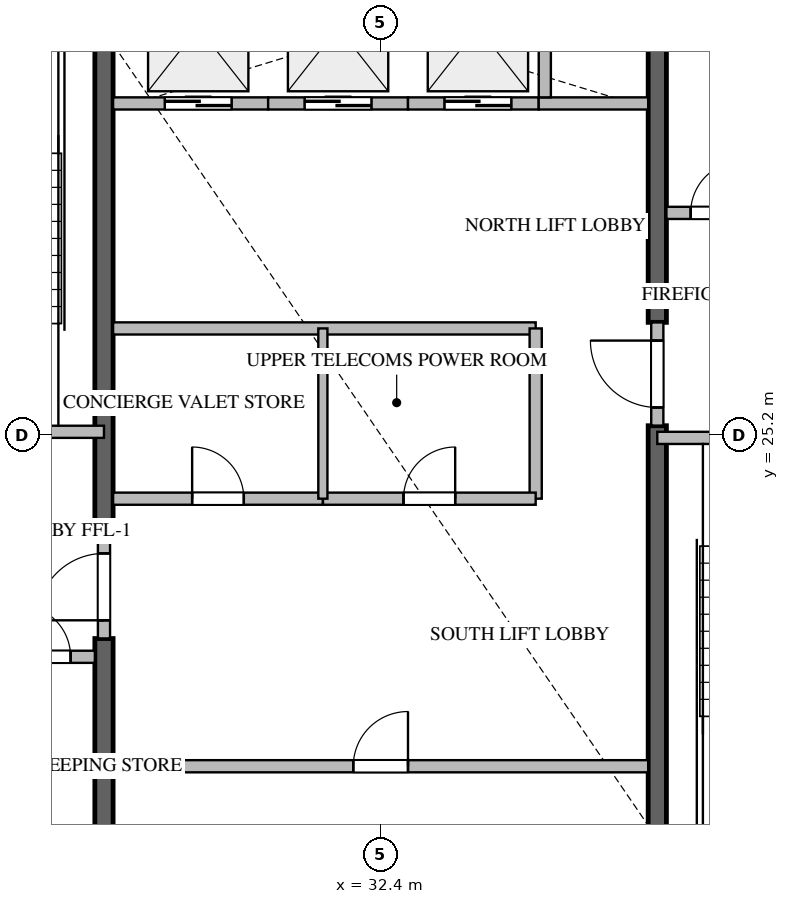
"""IFC4 building model, lengths in metres.
Left out: names, types, materials, properties, quantities, classifications, styles, units other than length and angle.
Written with IfcOpenShell. Run it as: python <this file> out.ifc"""

import sys

from ifc_helpers import new_model, si_unit, direction, frame, frame_2d, origin, place, context, subcontext, project, spatial, rectangle, extrude, source, transform, mapped, element, fill, save


model = new_model("IFC4")
c1 = context("Model", 3, precision=1e-05, world=origin(), true_north=direction((0.0, 1.0)))
c2 = subcontext(c1, "Body", "Model", "MODEL_VIEW")
j1 = project(units=[si_unit("LENGTHUNIT", "METRE"), si_unit("PLANEANGLEUNIT", "RADIAN")], contexts=[c1])
p1 = place(None, origin())
s1 = spatial("IfcSite", under=j1, at=p1, CompositionType="ELEMENT")
p2 = place(p1, origin())
s2 = spatial("IfcBuilding", under=s1, at=p2, CompositionType="ELEMENT")
p3 = place(p2, frame((0.0, 0.0, 325.85)))
s3 = spatial("IfcBuildingStorey", under=s2, at=p3, CompositionType="ELEMENT", Elevation=325.85)
p4 = place(p3, frame((27.85, 16.975, -0.26), z_axis=(0.0, 0.0, 1.0), x_axis=(0.0, 1.0, 0.0)))
e1 = element("IfcWall", 1, at=p4, inside=s3, PredefinedType="SHEAR", context=c2, shape_type="SweptSolid", body=[
    extrude(rectangle(XDim=4.875, YDim=0.3, at=frame_2d((2.438, 0.0))), origin(), (0.0, 0.0, 1.0), 4.048),
])
p5 = place(p3, frame((27.85, 23.55, -0.26), z_axis=(0.0, 0.0, 1.0), x_axis=(0.0, 1.0, 0.0)))
e2 = element("IfcWall", 2, at=p5, inside=s3, PredefinedType="SHEAR", context=c2, shape_type="SweptSolid", body=[
    extrude(rectangle(XDim=9.875, YDim=0.3, at=frame_2d((4.938, 0.0))), origin(), (0.0, 0.0, 1.0), 4.048),
])
p6 = place(p3, frame((36.95, 16.975, -0.26), z_axis=(0.0, 0.0, 1.0), x_axis=(0.0, 1.0, 0.0)))
e3 = element("IfcWall", 3, at=p6, inside=s3, PredefinedType="SHEAR", context=c2, shape_type="SweptSolid", body=[
    extrude(rectangle(XDim=8.375, YDim=0.3, at=frame_2d((4.188, 0.0))), origin(), (0.0, 0.0, 1.0), 4.048),
])
p7 = place(p3, frame((36.95, 27.05, -0.26), z_axis=(0.0, 0.0, 1.0), x_axis=(0.0, 1.0, 0.0)))
e4 = element("IfcWall", 4, at=p7, inside=s3, PredefinedType="SHEAR", context=c2, shape_type="SweptSolid", body=[
    extrude(rectangle(XDim=6.375, YDim=0.3, at=frame_2d((3.188, 0.0))), origin(), (0.0, 0.0, 1.0), 4.048),
])
p8 = place(p3, frame((23.4, 25.25, 0.0), z_axis=(0.0, 0.0, 1.0), x_axis=(1.0, 0.0, 0.0)))
e5 = element("IfcWall", 5, at=p8, inside=s3, PredefinedType="STANDARD", context=c2, shape_type="SweptSolid", body=[
    extrude(rectangle(XDim=4.45, YDim=0.2, at=frame_2d((2.225, 0.0))), origin(), (0.0, 0.0, 1.0), 3.79),
])
p9 = place(p8, frame((1.65, 0.0, 0.0)))
e6 = element("IfcOpeningElement", 6, at=p9, cuts=e5, PredefinedType="OPENING", context=c2, shape_type="SweptSolid", body=[
    extrude(rectangle(XDim=1.1, YDim=2.15, at=frame_2d((0.55, 1.075))), frame((0.0, 0.11, 0.0), z_axis=(0.0, -1.0, 0.0), x_axis=(1.0, 0.0, 0.0)), (0.0, 0.0, 1.0), 0.22),
])
p10 = place(p3, frame((36.95, 25.15, 0.0), z_axis=(0.0, 0.0, 1.0), x_axis=(1.0, 0.0, 0.0)))
e7 = element("IfcWall", 7, at=p10, inside=s3, PredefinedType="STANDARD", context=c2, shape_type="SweptSolid", body=[
    extrude(rectangle(XDim=4.45, YDim=0.2, at=frame_2d((2.225, 0.0))), origin(), (0.0, 0.0, 1.0), 3.79),
])
p11 = place(p10, frame((1.65, 0.0, 0.0)))
e8 = element("IfcOpeningElement", 8, at=p11, cuts=e7, PredefinedType="OPENING", context=c2, shape_type="SweptSolid", body=[
    extrude(rectangle(XDim=1.1, YDim=2.15, at=frame_2d((0.55, 1.075))), frame((0.0, 0.11, 0.0), z_axis=(0.0, -1.0, 0.0), x_axis=(1.0, 0.0, 0.0)), (0.0, 0.0, 1.0), 0.22),
])
p12 = place(p3, frame((28.0, 30.65, 0.0), z_axis=(0.0, 0.0, 1.0), x_axis=(1.0, 0.0, 0.0)))
e9 = element("IfcWall", 9, at=p12, inside=s3, PredefinedType="STANDARD", context=c2, shape_type="SweptSolid", body=[
    extrude(rectangle(XDim=2.55, YDim=0.2, at=frame_2d((1.275, 0.0))), origin(), (0.0, 0.0, 1.0), 3.79),
])
p13 = place(p12, frame((0.85, 0.0, 0.0)))
e10 = element("IfcOpeningElement", 10, at=p13, cuts=e9, PredefinedType="OPENING", context=c2, shape_type="SweptSolid", body=[
    extrude(rectangle(XDim=1.1, YDim=2.2, at=frame_2d((0.55, 1.1))), frame((0.0, 0.11, 0.0), z_axis=(0.0, -1.0, 0.0), x_axis=(1.0, 0.0, 0.0)), (0.0, 0.0, 1.0), 0.22),
])
p14 = place(p3, frame((30.55, 30.65, 0.0), z_axis=(0.0, 0.0, 1.0), x_axis=(1.0, 0.0, 0.0)))
e11 = element("IfcWall", 11, at=p14, inside=s3, PredefinedType="STANDARD", context=c2, shape_type="SweptSolid", body=[
    extrude(rectangle(XDim=2.3, YDim=0.2, at=frame_2d((1.15, 0.0))), origin(), (0.0, 0.0, 1.0), 3.79),
])
p15 = place(p14, frame((0.6, 0.0, 0.0)))
e12 = element("IfcOpeningElement", 12, at=p15, cuts=e11, PredefinedType="OPENING", context=c2, shape_type="SweptSolid", body=[
    extrude(rectangle(XDim=1.1, YDim=2.2, at=frame_2d((0.55, 1.1))), frame((0.0, 0.11, 0.0), z_axis=(0.0, -1.0, 0.0), x_axis=(1.0, 0.0, 0.0)), (0.0, 0.0, 1.0), 0.22),
])
p16 = place(p3, frame((32.85, 30.65, 0.0), z_axis=(0.0, 0.0, 1.0), x_axis=(1.0, 0.0, 0.0)))
e13 = element("IfcWall", 13, at=p16, inside=s3, PredefinedType="STANDARD", context=c2, shape_type="SweptSolid", body=[
    extrude(rectangle(XDim=2.15, YDim=0.2, at=frame_2d((1.075, 0.0))), origin(), (0.0, 0.0, 1.0), 3.79),
])
p17 = place(p16, frame((0.6, 0.0, 0.0)))
e14 = element("IfcOpeningElement", 14, at=p17, cuts=e13, PredefinedType="OPENING", context=c2, shape_type="SweptSolid", body=[
    extrude(rectangle(XDim=1.1, YDim=2.2, at=frame_2d((0.55, 1.1))), frame((0.0, 0.11, 0.0), z_axis=(0.0, -1.0, 0.0), x_axis=(1.0, 0.0, 0.0)), (0.0, 0.0, 1.0), 0.22),
])
p18 = place(p3, frame((35.0, 30.65, 0.0), z_axis=(0.0, 0.0, 1.0), x_axis=(1.0, 0.0, 0.0)))
e15 = element("IfcWall", 15, at=p18, inside=s3, PredefinedType="STANDARD", context=c2, shape_type="SweptSolid", body=[
    extrude(rectangle(XDim=1.8, YDim=0.2, at=frame_2d((0.9, 0.0))), origin(), (0.0, 0.0, 1.0), 3.79),
])
p19 = place(p3, frame((35.1, 30.75, 0.0), z_axis=(0.0, 0.0, 1.0), x_axis=(0.0, 1.0, 0.0)))
e16 = element("IfcWall", 16, at=p19, inside=s3, PredefinedType="STANDARD", context=c2, shape_type="SweptSolid", body=[
    extrude(rectangle(XDim=2.675, YDim=0.2, at=frame_2d((1.337, 0.0))), origin(), (0.0, 0.0, 1.0), 3.79),
])
p20 = place(p3, frame((26.052, 21.55, 0.0), z_axis=(0.0, 0.0, 1.0), x_axis=(1.0, 0.0, 0.0)))
e17 = element("IfcWall", 17, at=p20, inside=s3, PredefinedType="STANDARD", context=c2, shape_type="SweptSolid", body=[
    extrude(rectangle(XDim=1.648, YDim=0.2, at=frame_2d((0.824, 0.0))), origin(), (0.0, 0.0, 1.0), 3.79),
])
p21 = place(p20, frame((0.399, 0.0, 0.0)))
e18 = element("IfcOpeningElement", 18, at=p21, cuts=e17, PredefinedType="OPENING", context=c2, shape_type="SweptSolid", body=[
    extrude(rectangle(XDim=0.85, YDim=2.1, at=frame_2d((0.425, 1.05))), frame((0.0, 0.11, 0.0), z_axis=(0.0, -1.0, 0.0), x_axis=(1.0, 0.0, 0.0)), (0.0, 0.0, 1.0), 0.22),
])
p22 = place(p3, frame((37.1, 28.85, 0.0), z_axis=(0.0, 0.0, 1.0), x_axis=(1.0, 0.0, 0.0)))
e19 = element("IfcWall", 19, at=p22, inside=s3, PredefinedType="STANDARD", context=c2, shape_type="SweptSolid", body=[
    extrude(rectangle(XDim=1.648, YDim=0.2, at=frame_2d((0.824, 0.0))), origin(), (0.0, 0.0, 1.0), 3.79),
])
p23 = place(p22, frame((0.399, 0.0, 0.0)))
e20 = element("IfcOpeningElement", 20, at=p23, cuts=e19, PredefinedType="OPENING", context=c2, shape_type="SweptSolid", body=[
    extrude(rectangle(XDim=0.85, YDim=2.1, at=frame_2d((0.425, 1.05))), frame((0.0, 0.11, 0.0), z_axis=(0.0, -1.0, 0.0), x_axis=(1.0, 0.0, 0.0)), (0.0, 0.0, 1.0), 0.22),
])
p24 = place(p3, frame((27.85, 21.852, 0.0), z_axis=(0.0, 0.0, 1.0), x_axis=(0.0, 1.0, 0.0)))
e21 = element("IfcWall", 21, at=p24, inside=s3, PredefinedType="STANDARD", context=c2, shape_type="SweptSolid", body=[
    extrude(rectangle(XDim=1.696, YDim=0.2, at=frame_2d((0.848, 0.0))), origin(), (0.0, 0.0, 1.0), 3.79),
])
p25 = place(p24, frame((0.298, 0.0, 0.0)))
e22 = element("IfcOpeningElement", 22, at=p25, cuts=e21, PredefinedType="OPENING", context=c2, shape_type="SweptSolid", body=[
    extrude(rectangle(XDim=1.1, YDim=2.15, at=frame_2d((0.55, 1.075))), frame((0.0, 0.11, 0.0), z_axis=(0.0, -1.0, 0.0), x_axis=(1.0, 0.0, 0.0)), (0.0, 0.0, 1.0), 0.22),
])
p26 = place(p3, frame((36.95, 25.352, 0.0), z_axis=(0.0, 0.0, 1.0), x_axis=(0.0, 1.0, 0.0)))
e23 = element("IfcWall", 23, at=p26, inside=s3, PredefinedType="STANDARD", context=c2, shape_type="SweptSolid", body=[
    extrude(rectangle(XDim=1.696, YDim=0.2, at=frame_2d((0.848, 0.0))), origin(), (0.0, 0.0, 1.0), 3.79),
])
p27 = place(p26, frame((0.298, 0.0, 0.0)))
e24 = element("IfcOpeningElement", 24, at=p27, cuts=e23, PredefinedType="OPENING", context=c2, shape_type="SweptSolid", body=[
    extrude(rectangle(XDim=1.1, YDim=2.15, at=frame_2d((0.55, 1.075))), frame((0.0, 0.11, 0.0), z_axis=(0.0, -1.0, 0.0), x_axis=(1.0, 0.0, 0.0)), (0.0, 0.0, 1.0), 0.22),
])
p28 = place(p3, frame((28.0, 19.75, 0.0), z_axis=(0.0, 0.0, 1.0), x_axis=(1.0, 0.0, 0.0)))
e25 = element("IfcWall", 25, at=p28, inside=s3, PredefinedType="STANDARD", context=c2, shape_type="SweptSolid", body=[
    extrude(rectangle(XDim=8.8, YDim=0.2, at=frame_2d((4.4, 0.0))), origin(), (0.0, 0.0, 1.0), 3.79),
])
p29 = place(p28, frame((3.95, 0.0, 0.0)))
e26 = element("IfcOpeningElement", 26, at=p29, cuts=e25, PredefinedType="OPENING", context=c2, shape_type="SweptSolid", body=[
    extrude(rectangle(XDim=0.9, YDim=2.1, at=frame_2d((0.45, 1.05))), frame((0.0, 0.11, 0.0), z_axis=(0.0, -1.0, 0.0), x_axis=(1.0, 0.0, 0.0)), (0.0, 0.0, 1.0), 0.22),
])
p30 = place(p3, frame((28.0, 26.95, 0.0), z_axis=(0.0, 0.0, 1.0), x_axis=(1.0, 0.0, 0.0)))
e27 = element("IfcWall", 27, at=p30, inside=s3, PredefinedType="STANDARD", context=c2, shape_type="SweptSolid", body=[
    extrude(rectangle(XDim=6.95, YDim=0.2, at=frame_2d((3.475, 0.0))), origin(), (0.0, 0.0, 1.0), 3.79),
])
p31 = place(p3, frame((34.95, 24.15, 0.0), z_axis=(0.0, 0.0, 1.0), x_axis=(0.0, 1.0, 0.0)))
e28 = element("IfcWall", 28, at=p31, inside=s3, PredefinedType="STANDARD", context=c2, shape_type="SweptSolid", body=[
    extrude(rectangle(XDim=2.8, YDim=0.2, at=frame_2d((1.4, 0.0))), origin(), (0.0, 0.0, 1.0), 3.79),
])
p32 = place(p3, frame((28.0, 24.15, 0.0), z_axis=(0.0, 0.0, 1.0), x_axis=(1.0, 0.0, 0.0)))
e29 = element("IfcWall", 29, at=p32, inside=s3, PredefinedType="STANDARD", context=c2, shape_type="SweptSolid", body=[
    extrude(rectangle(XDim=3.45, YDim=0.2, at=frame_2d((1.725, 0.0))), origin(), (0.0, 0.0, 1.0), 3.79),
])
p33 = place(p32, frame((1.3, 0.0, 0.0)))
e30 = element("IfcOpeningElement", 30, at=p33, cuts=e29, PredefinedType="OPENING", context=c2, shape_type="SweptSolid", body=[
    extrude(rectangle(XDim=0.85, YDim=2.1, at=frame_2d((0.425, 1.05))), frame((0.0, 0.11, 0.0), z_axis=(0.0, -1.0, 0.0), x_axis=(1.0, 0.0, 0.0)), (0.0, 0.0, 1.0), 0.22),
])
p34 = place(p3, frame((31.452, 24.15, 0.0), z_axis=(0.0, 0.0, 1.0), x_axis=(1.0, 0.0, 0.0)))
e31 = element("IfcWall", 31, at=p34, inside=s3, PredefinedType="STANDARD", context=c2, shape_type="SweptSolid", body=[
    extrude(rectangle(XDim=3.498, YDim=0.2, at=frame_2d((1.749, 0.0))), origin(), (0.0, 0.0, 1.0), 3.79),
])
p35 = place(p34, frame((1.324, 0.0, 0.0)))
e32 = element("IfcOpeningElement", 32, at=p35, cuts=e31, PredefinedType="OPENING", context=c2, shape_type="SweptSolid", body=[
    extrude(rectangle(XDim=0.85, YDim=2.1, at=frame_2d((0.425, 1.05))), frame((0.0, 0.11, 0.0), z_axis=(0.0, -1.0, 0.0), x_axis=(1.0, 0.0, 0.0)), (0.0, 0.0, 1.0), 0.22),
])
p36 = place(p3, frame((31.45, 24.15, 0.0), z_axis=(0.0, 0.0, 1.0), x_axis=(0.0, 1.0, 0.0)))
e33 = element("IfcWall", 33, at=p36, inside=s3, PredefinedType="PARTITIONING", context=c2, shape_type="SweptSolid", body=[
    extrude(rectangle(XDim=2.8, YDim=0.15, at=frame_2d((1.4, 0.0))), origin(), (0.0, 0.0, 1.0), 3.79),
])
m1 = source(origin(), c2, "Body", "SweptSolid", [
    extrude(rectangle(XDim=1.1, YDim=2.2, at=frame_2d((0.55, 1.1))), frame((0.0, 0.025, 0.0), z_axis=(0.0, -1.0, 0.0), x_axis=(1.0, 0.0, 0.0)), (0.0, 0.0, 1.0), 0.05),
])
p37 = place(p13, origin())
e34 = element("IfcDoor", 34, at=p37, inside=s3, OperationType="DOUBLE_DOOR_SLIDING", PredefinedType="DOOR", context=c2, shape_type="MappedRepresentation", body=[
    mapped(m1, transform((0.0, 0.0, 0.0), scale=1.0)),
])
fill(e10, e34)
p38 = place(p15, origin())
e35 = element("IfcDoor", 35, at=p38, inside=s3, OperationType="DOUBLE_DOOR_SLIDING", PredefinedType="DOOR", context=c2, shape_type="MappedRepresentation", body=[
    mapped(m1, transform((0.0, 0.0, 0.0), scale=1.0)),
])
fill(e12, e35)
p39 = place(p17, origin())
e36 = element("IfcDoor", 36, at=p39, inside=s3, OperationType="DOUBLE_DOOR_SLIDING", PredefinedType="DOOR", context=c2, shape_type="MappedRepresentation", body=[
    mapped(m1, transform((0.0, 0.0, 0.0), scale=1.0)),
])
fill(e14, e36)
m2 = source(origin(), c2, "Body", "SweptSolid", [
    extrude(rectangle(XDim=0.85, YDim=2.1, at=frame_2d((0.425, 1.05))), frame((0.0, 0.025, 0.0), z_axis=(0.0, -1.0, 0.0), x_axis=(1.0, 0.0, 0.0)), (0.0, 0.0, 1.0), 0.05),
])
p40 = place(p21, origin())
e37 = element("IfcDoor", 37, at=p40, inside=s3, OperationType="SINGLE_SWING_LEFT", PredefinedType="DOOR", context=c2, shape_type="MappedRepresentation", body=[
    mapped(m2, transform((0.0, 0.0, 0.0), scale=1.0)),
])
fill(e18, e37)
p41 = place(p23, origin())
e38 = element("IfcDoor", 38, at=p41, inside=s3, OperationType="SINGLE_SWING_RIGHT", PredefinedType="DOOR", context=c2, shape_type="MappedRepresentation", body=[
    mapped(m2, transform((0.0, 0.0, 0.0), scale=1.0)),
])
fill(e20, e38)
m3 = source(origin(), c2, "Body", "SweptSolid", [
    extrude(rectangle(XDim=1.1, YDim=2.15, at=frame_2d((0.55, 1.075))), frame((0.0, 0.025, 0.0), z_axis=(0.0, -1.0, 0.0), x_axis=(1.0, 0.0, 0.0)), (0.0, 0.0, 1.0), 0.05),
])
p42 = place(p25, origin())
e39 = element("IfcDoor", 39, at=p42, inside=s3, OperationType="SINGLE_SWING_LEFT", PredefinedType="DOOR", context=c2, shape_type="MappedRepresentation", body=[
    mapped(m3, transform((0.0, 0.0, 0.0), scale=1.0)),
])
fill(e22, e39)
p43 = place(p27, origin())
e40 = element("IfcDoor", 40, at=p43, inside=s3, OperationType="SINGLE_SWING_RIGHT", PredefinedType="DOOR", context=c2, shape_type="MappedRepresentation", body=[
    mapped(m3, transform((0.0, 0.0, 0.0), scale=1.0)),
])
fill(e24, e40)
m4 = source(origin(), c2, "Body", "SweptSolid", [
    extrude(rectangle(XDim=0.9, YDim=2.1, at=frame_2d((0.45, 1.05))), frame((0.0, 0.025, 0.0), z_axis=(0.0, -1.0, 0.0), x_axis=(1.0, 0.0, 0.0)), (0.0, 0.0, 1.0), 0.05),
])
p44 = place(p29, origin())
e41 = element("IfcDoor", 41, at=p44, inside=s3, OperationType="SINGLE_SWING_RIGHT", PredefinedType="DOOR", context=c2, shape_type="MappedRepresentation", body=[
    mapped(m4, transform((0.0, 0.0, 0.0), scale=1.0)),
])
fill(e26, e41)
p45 = place(p33, origin())
e42 = element("IfcDoor", 42, at=p45, inside=s3, OperationType="SINGLE_SWING_LEFT", PredefinedType="DOOR", context=c2, shape_type="MappedRepresentation", body=[
    mapped(m2, transform((0.0, 0.0, 0.0), scale=1.0)),
])
fill(e30, e42)
p46 = place(p35, origin())
e43 = element("IfcDoor", 43, at=p46, inside=s3, OperationType="SINGLE_SWING_RIGHT", PredefinedType="DOOR", context=c2, shape_type="MappedRepresentation", body=[
    mapped(m2, transform((0.0, 0.0, 0.0), scale=1.0)),
])
fill(e32, e43)
save(model, sys.argv[1])
